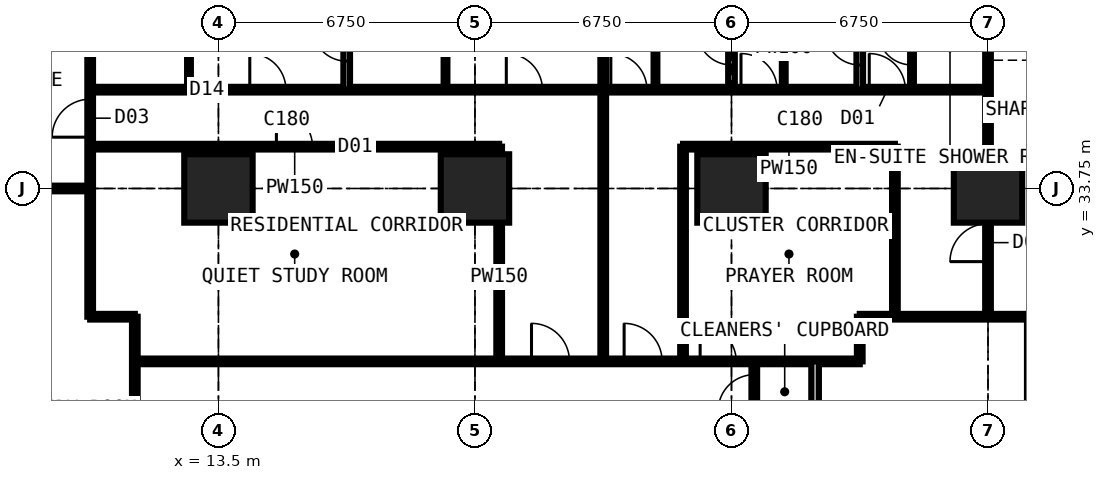
"""IFC4 building model, lengths in metres.
Left out: names, types, materials, properties, quantities, classifications, styles, units other than length and angle.
Written with IfcOpenShell. Run it as: python <this file> out.ifc"""

import sys

from ifc_helpers import new_model, si_unit, direction, frame, frame_2d, origin, origin_2d, place, context, subcontext, project, spatial, rectangle, extrude, element, fill, save


model = new_model("IFC4")
c1 = context("Model", 3, precision=1e-05, world=origin(), true_north=direction((0.0, 1.0)))
c2 = subcontext(c1, "Body", "Model", "MODEL_VIEW")
j1 = project(units=[si_unit("LENGTHUNIT", "METRE"), si_unit("PLANEANGLEUNIT", "RADIAN")], contexts=[c1])
p1 = place(None, origin())
s1 = spatial("IfcSite", under=j1, at=p1, CompositionType="ELEMENT")
p2 = place(p1, origin())
s2 = spatial("IfcBuilding", under=s1, at=p2, CompositionType="ELEMENT")
p3 = place(p2, frame((0.0, 0.0, 61.2)))
s3 = spatial("IfcBuildingStorey", under=s2, at=p3, CompositionType="ELEMENT", Elevation=61.2)
for number, where, z_axis, x_axis in (
    (1, (13.5, 33.75, 0.0), (0.0, 0.0, 1.0), (1.0, 0.0, 0.0)),
    (2, (20.25, 33.75, 0.0), (0.0, 0.0, 1.0), (1.0, 0.0, 0.0)),
    (3, (27.0, 33.75, 0.0), (0.0, 0.0, 1.0), (1.0, 0.0, 0.0)),
    (4, (33.75, 33.75, 0.0), (0.0, 0.0, 1.0), (1.0, 0.0, 0.0)),
):
    element("IfcColumn", number, at=place(p3, frame(where, z_axis=z_axis, x_axis=x_axis)), inside=s3, PredefinedType="COLUMN", context=c2, shape_type="SweptSolid", body=[
        extrude(rectangle(XDim=1.8, YDim=1.8, at=origin_2d()), origin(), (0.0, 0.0, 1.0), 3.6),
    ])
p4 = place(p3, frame((4.15, 33.75, 0.0), z_axis=(0.0, 0.0, 1.0), x_axis=(1.0, 0.0, 0.0)))
e5 = element("IfcWall", 5, at=p4, inside=s3, PredefinedType="PARTITIONING", context=c2, shape_type="SweptSolid", body=[
    extrude(rectangle(XDim=5.975, YDim=0.15, at=frame_2d((2.988, 0.0))), origin(), (0.0, 0.0, 1.0), 2.877),
])
p5 = place(p3, frame((10.125, 30.375, 0.0), z_axis=(0.0, 0.0, 1.0), x_axis=(0.0, 1.0, 0.0)))
e6 = element("IfcWall", 6, at=p5, inside=s3, PredefinedType="PARTITIONING", context=c2, shape_type="SweptSolid", body=[
    extrude(rectangle(XDim=10.859, YDim=0.15, at=frame_2d((5.429, 0.0))), origin(), (0.0, 0.0, 1.0), 3.375),
])
p6 = place(p5, frame((4.725, 0.0, 0.0)))
e7 = element("IfcOpeningElement", 7, at=p6, cuts=e6, PredefinedType="OPENING", context=c2, shape_type="SweptSolid", body=[
    extrude(rectangle(XDim=1.0, YDim=2.2, at=frame_2d((0.5, 1.1))), frame((0.0, 0.085, 0.0), z_axis=(0.0, -1.0, 0.0), x_axis=(1.0, 0.0, 0.0)), (0.0, 0.0, 1.0), 0.17),
])
p7 = place(p3, frame((10.125, 30.375, 0.0), z_axis=(0.0, 0.0, 1.0), x_axis=(1.0, 0.0, 0.0)))
e8 = element("IfcWall", 8, at=p7, inside=s3, PredefinedType="PARTITIONING", context=c2, shape_type="SweptSolid", body=[
    extrude(rectangle(XDim=1.175, YDim=0.15, at=frame_2d((0.587, 0.0))), origin(), (0.0, 0.0, 1.0), 3.375),
])
p8 = place(p3, frame((10.125, 34.85, 0.0), z_axis=(0.0, 0.0, 1.0), x_axis=(1.0, 0.0, 0.0)))
e9 = element("IfcWall", 9, at=p8, inside=s3, PredefinedType="PARTITIONING", context=c2, shape_type="SweptSolid", body=[
    extrude(rectangle(XDim=10.762, YDim=0.15, at=frame_2d((5.381, 0.0))), origin(), (0.0, 0.0, 1.0), 3.375),
])
p9 = place(p8, frame((4.9, 0.0, 0.0)))
e10 = element("IfcOpeningElement", 10, at=p9, cuts=e9, PredefinedType="OPENING", context=c2, shape_type="SweptSolid", body=[
    extrude(rectangle(XDim=0.95, YDim=2.2, at=frame_2d((0.475, 1.1))), frame((0.0, 0.085, 0.0), z_axis=(0.0, -1.0, 0.0), x_axis=(1.0, 0.0, 0.0)), (0.0, 0.0, 1.0), 0.17),
])
p10 = place(p3, frame((10.125, 36.35, 0.0), z_axis=(0.0, 0.0, 1.0), x_axis=(1.0, 0.0, 0.0)))
e11 = element("IfcWall", 11, at=p10, inside=s3, PredefinedType="PARTITIONING", context=c2, shape_type="SweptSolid", body=[
    extrude(rectangle(XDim=23.625, YDim=0.15, at=frame_2d((11.812, 0.0))), origin(), (0.0, 0.0, 1.0), 3.375),
])
p11 = place(p10, frame((20.5, 0.0, 0.0)))
e12 = element("IfcOpeningElement", 12, at=p11, cuts=e11, PredefinedType="OPENING", context=c2, shape_type="SweptSolid", body=[
    extrude(rectangle(XDim=0.95, YDim=2.2, at=frame_2d((0.475, 1.1))), frame((0.0, 0.085, 0.0), z_axis=(0.0, -1.0, 0.0), x_axis=(1.0, 0.0, 0.0)), (0.0, 0.0, 1.0), 0.17),
])
p12 = place(p10, frame((17.125, 0.0, 0.0)))
e13 = element("IfcOpeningElement", 13, at=p12, cuts=e11, PredefinedType="OPENING", context=c2, shape_type="SweptSolid", body=[
    extrude(rectangle(XDim=0.95, YDim=2.2, at=frame_2d((0.475, 1.1))), frame((0.0, 0.085, 0.0), z_axis=(0.0, -1.0, 0.0), x_axis=(1.0, 0.0, 0.0)), (0.0, 0.0, 1.0), 0.17),
])
p13 = place(p10, frame((13.7, 0.0, 0.0)))
e14 = element("IfcOpeningElement", 14, at=p13, cuts=e11, PredefinedType="OPENING", context=c2, shape_type="SweptSolid", body=[
    extrude(rectangle(XDim=0.95, YDim=2.2, at=frame_2d((0.475, 1.1))), frame((0.0, 0.085, 0.0), z_axis=(0.0, -1.0, 0.0), x_axis=(1.0, 0.0, 0.0)), (0.0, 0.0, 1.0), 0.17),
])
p14 = place(p10, frame((4.2, 0.0, 0.0)))
e15 = element("IfcOpeningElement", 15, at=p14, cuts=e11, PredefinedType="OPENING", context=c2, shape_type="SweptSolid", body=[
    extrude(rectangle(XDim=0.95, YDim=2.2, at=frame_2d((0.475, 1.1))), frame((0.0, 0.085, 0.0), z_axis=(0.0, -1.0, 0.0), x_axis=(1.0, 0.0, 0.0)), (0.0, 0.0, 1.0), 0.17),
])
p15 = place(p10, frame((10.95, 0.0, 0.0)))
e16 = element("IfcOpeningElement", 16, at=p15, cuts=e11, PredefinedType="OPENING", context=c2, shape_type="SweptSolid", body=[
    extrude(rectangle(XDim=0.95, YDim=2.2, at=frame_2d((0.475, 1.1))), frame((0.0, 0.085, 0.0), z_axis=(0.0, -1.0, 0.0), x_axis=(1.0, 0.0, 0.0)), (0.0, 0.0, 1.0), 0.17),
])
p16 = place(p3, frame((11.3, 11.3, 0.0), z_axis=(0.0, 0.0, 1.0), x_axis=(0.0, 1.0, 0.0)))
e17 = element("IfcWall", 17, at=p16, inside=s3, PredefinedType="PARTITIONING", context=c2, shape_type="SweptSolid", body=[
    extrude(rectangle(XDim=19.075, YDim=0.15, at=frame_2d((9.538, 0.0))), origin(), (0.0, 0.0, 1.0), 3.375),
])
p17 = place(p16, frame((10.137, 0.0, 0.0)))
e18 = element("IfcOpeningElement", 18, at=p17, cuts=e17, PredefinedType="OPENING", context=c2, shape_type="SweptSolid", body=[
    extrude(rectangle(XDim=1.0, YDim=2.2, at=frame_2d((0.5, 1.1))), frame((0.0, 0.085, 0.0), z_axis=(0.0, -1.0, 0.0), x_axis=(1.0, 0.0, 0.0)), (0.0, 0.0, 1.0), 0.17),
])
p18 = place(p3, frame((11.3, 29.2, 0.0), z_axis=(0.0, 0.0, 1.0), x_axis=(1.0, 0.0, 0.0)))
e19 = element("IfcWall", 19, at=p18, inside=s3, PredefinedType="PARTITIONING", context=c2, shape_type="SweptSolid", body=[
    extrude(rectangle(XDim=19.075, YDim=0.15, at=frame_2d((9.538, 0.0))), origin(), (0.0, 0.0, 1.0), 3.375),
])
p19 = place(p18, frame((12.875, 0.0, 0.0)))
e20 = element("IfcOpeningElement", 20, at=p19, cuts=e19, PredefinedType="OPENING", context=c2, shape_type="SweptSolid", body=[
    extrude(rectangle(XDim=1.0, YDim=2.2, at=frame_2d((0.5, 1.1))), frame((0.0, 0.085, 0.0), z_axis=(0.0, -1.0, 0.0), x_axis=(1.0, 0.0, 0.0)), (0.0, 0.0, 1.0), 0.17),
])
p20 = place(p18, frame((10.438, 0.0, 0.0)))
e21 = element("IfcOpeningElement", 21, at=p20, cuts=e19, PredefinedType="OPENING", context=c2, shape_type="SweptSolid", body=[
    extrude(rectangle(XDim=1.0, YDim=2.2, at=frame_2d((0.5, 1.1))), frame((0.0, 0.085, 0.0), z_axis=(0.0, -1.0, 0.0), x_axis=(1.0, 0.0, 0.0)), (0.0, 0.0, 1.0), 0.17),
])
p21 = place(p18, frame((14.875, 0.0, 0.0)))
e22 = element("IfcOpeningElement", 22, at=p21, cuts=e19, PredefinedType="OPENING", context=c2, shape_type="SweptSolid", body=[
    extrude(rectangle(XDim=0.95, YDim=2.2, at=frame_2d((0.475, 1.1))), frame((0.0, 0.085, 0.0), z_axis=(0.0, -1.0, 0.0), x_axis=(1.0, 0.0, 0.0)), (0.0, 0.0, 1.0), 0.17),
])
p22 = place(p3, frame((12.725, 36.35, 0.0), z_axis=(0.0, 0.0, 1.0), x_axis=(0.0, 1.0, 0.0)))
e23 = element("IfcWall", 23, at=p22, inside=s3, PredefinedType="PARTITIONING", context=c2, shape_type="SweptSolid", body=[
    extrude(rectangle(XDim=2.4, YDim=0.1, at=frame_2d((1.2, 0.0))), origin(), (0.0, 0.0, 1.0), 3.375),
])
p23 = place(p3, frame((16.875, 36.35, 0.0), z_axis=(0.0, 0.0, 1.0), x_axis=(0.0, 1.0, 0.0)))
e24 = element("IfcWall", 24, at=p23, inside=s3, PredefinedType="PARTITIONING", context=c2, shape_type="SweptSolid", body=[
    extrude(rectangle(XDim=4.884, YDim=0.175, at=frame_2d((2.442, 0.0))), origin(), (0.0, 0.0, 1.0), 3.375),
])
p24 = place(p23, frame((0.75, 0.0, 0.0)))
e25 = element("IfcOpeningElement", 25, at=p24, cuts=e24, PredefinedType="OPENING", context=c2, shape_type="SweptSolid", body=[
    extrude(rectangle(XDim=0.9, YDim=2.2, at=frame_2d((0.45, 1.1))), frame((0.0, 0.097, 0.0), z_axis=(0.0, -1.0, 0.0), x_axis=(1.0, 0.0, 0.0)), (0.0, 0.0, 1.0), 0.195),
])
p25 = place(p3, frame((19.475, 36.35, 0.0), z_axis=(0.0, 0.0, 1.0), x_axis=(0.0, 1.0, 0.0)))
e26 = element("IfcWall", 26, at=p25, inside=s3, PredefinedType="PARTITIONING", context=c2, shape_type="SweptSolid", body=[
    extrude(rectangle(XDim=2.4, YDim=0.1, at=frame_2d((1.2, 0.0))), origin(), (0.0, 0.0, 1.0), 3.375),
])
p26 = place(p3, frame((20.887, 29.2, 0.0), z_axis=(0.0, 0.0, 1.0), x_axis=(0.0, 1.0, 0.0)))
e27 = element("IfcWall", 27, at=p26, inside=s3, PredefinedType="PARTITIONING", context=c2, shape_type="SweptSolid", body=[
    extrude(rectangle(XDim=5.65, YDim=0.15, at=frame_2d((2.825, 0.0))), origin(), (0.0, 0.0, 1.0), 3.375),
])
p27 = place(p3, frame((23.625, 29.2, 0.0), z_axis=(0.0, 0.0, 1.0), x_axis=(0.0, 1.0, 0.0)))
e28 = element("IfcWall", 28, at=p27, inside=s3, PredefinedType="PARTITIONING", context=c2, shape_type="SweptSolid", body=[
    extrude(rectangle(XDim=12.034, YDim=0.15, at=frame_2d((6.017, 0.0))), origin(), (0.0, 0.0, 1.0), 3.375),
])
p28 = place(p3, frame((25.0, 36.35, 0.0), z_axis=(0.0, 0.0, 1.0), x_axis=(0.0, 1.0, 0.0)))
e29 = element("IfcWall", 29, at=p28, inside=s3, PredefinedType="PARTITIONING", context=c2, shape_type="SweptSolid", body=[
    extrude(rectangle(XDim=2.2, YDim=0.1, at=frame_2d((1.1, 0.0))), origin(), (0.0, 0.0, 1.0), 3.375),
])
p29 = place(p3, frame((25.725, 29.2, 0.0), z_axis=(0.0, 0.0, 1.0), x_axis=(0.0, 1.0, 0.0)))
e30 = element("IfcWall", 30, at=p29, inside=s3, PredefinedType="PARTITIONING", context=c2, shape_type="SweptSolid", body=[
    extrude(rectangle(XDim=5.65, YDim=0.15, at=frame_2d((2.825, 0.0))), origin(), (0.0, 0.0, 1.0), 3.375),
])
p30 = place(p3, frame((25.725, 34.85, 0.0), z_axis=(0.0, 0.0, 1.0), x_axis=(1.0, 0.0, 0.0)))
e31 = element("IfcWall", 31, at=p30, inside=s3, PredefinedType="PARTITIONING", context=c2, shape_type="SweptSolid", body=[
    extrude(rectangle(XDim=5.575, YDim=0.15, at=frame_2d((2.788, 0.0))), origin(), (0.0, 0.0, 1.0), 3.375),
])
p31 = place(p3, frame((27.0, 36.35, 0.0), z_axis=(0.0, 0.0, 1.0), x_axis=(0.0, 1.0, 0.0)))
e32 = element("IfcWall", 32, at=p31, inside=s3, PredefinedType="PARTITIONING", context=c2, shape_type="SweptSolid", body=[
    extrude(rectangle(XDim=4.884, YDim=0.175, at=frame_2d((2.442, 0.0))), origin(), (0.0, 0.0, 1.0), 2.61),
])
p32 = place(p31, frame((0.65, 0.0, 0.0)))
e33 = element("IfcOpeningElement", 33, at=p32, cuts=e32, PredefinedType="OPENING", context=c2, shape_type="SweptSolid", body=[
    extrude(rectangle(XDim=0.9, YDim=2.2, at=frame_2d((0.45, 1.1))), frame((0.0, 0.097, 0.0), z_axis=(0.0, -1.0, 0.0), x_axis=(1.0, 0.0, 0.0)), (0.0, 0.0, 1.0), 0.195),
])
p33 = place(p3, frame((27.6, 27.6, 0.0), z_axis=(0.0, 0.0, 1.0), x_axis=(0.0, 1.0, 0.0)))
e34 = element("IfcWall", 34, at=p33, inside=s3, PredefinedType="PARTITIONING", context=c2, shape_type="SweptSolid", body=[
    extrude(rectangle(XDim=1.6, YDim=0.15, at=frame_2d((0.8, 0.0))), origin(), (0.0, 0.0, 1.0), 3.375),
])
p34 = place(p33, frame((0.3, 0.0, 0.0)))
e35 = element("IfcOpeningElement", 35, at=p34, cuts=e34, PredefinedType="OPENING", context=c2, shape_type="SweptSolid", body=[
    extrude(rectangle(XDim=0.95, YDim=2.2, at=frame_2d((0.475, 1.1))), frame((0.0, 0.085, 0.0), z_axis=(0.0, -1.0, 0.0), x_axis=(1.0, 0.0, 0.0)), (0.0, 0.0, 1.0), 0.17),
])
p35 = place(p3, frame((28.375, 36.35, 0.0), z_axis=(0.0, 0.0, 1.0), x_axis=(0.0, 1.0, 0.0)))
e36 = element("IfcWall", 36, at=p35, inside=s3, PredefinedType="PARTITIONING", context=c2, shape_type="SweptSolid", body=[
    extrude(rectangle(XDim=2.2, YDim=0.1, at=frame_2d((1.1, 0.0))), origin(), (0.0, 0.0, 1.0), 3.375),
])
p36 = place(p3, frame((29.2, 11.3, 0.0), z_axis=(0.0, 0.0, 1.0), x_axis=(0.0, 1.0, 0.0)))
e37 = element("IfcWall", 37, at=p36, inside=s3, PredefinedType="PARTITIONING", context=c2, shape_type="SweptSolid", body=[
    extrude(rectangle(XDim=17.9, YDim=0.2, at=frame_2d((8.95, 0.0))), origin(), (0.0, 0.0, 1.0), 3.375),
])
p37 = place(p36, frame((8.35, 0.0, 0.0)))
e38 = element("IfcOpeningElement", 38, at=p37, cuts=e37, PredefinedType="OPENING", context=c2, shape_type="SweptSolid", body=[
    extrude(rectangle(XDim=1.2, YDim=2.2, at=frame_2d((0.6, 1.1))), frame((0.0, 0.11, 0.0), z_axis=(0.0, -1.0, 0.0), x_axis=(1.0, 0.0, 0.0)), (0.0, 0.0, 1.0), 0.22),
])
p38 = place(p3, frame((30.375, 29.2, 0.0), z_axis=(0.0, 0.0, 1.0), x_axis=(0.0, 1.0, 0.0)))
e39 = element("IfcWall", 39, at=p38, inside=s3, PredefinedType="PARTITIONING", context=c2, shape_type="SweptSolid", body=[
    extrude(rectangle(XDim=1.175, YDim=0.15, at=frame_2d((0.587, 0.0))), origin(), (0.0, 0.0, 1.0), 3.375),
])
p39 = place(p3, frame((30.375, 30.375, 0.0), z_axis=(0.0, 0.0, 1.0), x_axis=(1.0, 0.0, 0.0)))
e40 = element("IfcWall", 40, at=p39, inside=s3, PredefinedType="PARTITIONING", context=c2, shape_type="SweptSolid", body=[
    extrude(rectangle(XDim=10.859, YDim=0.15, at=frame_2d((5.429, 0.0))), origin(), (0.0, 0.0, 1.0), 3.375),
])
p40 = place(p3, frame((30.375, 36.35, 0.0), z_axis=(0.0, 0.0, 1.0), x_axis=(0.0, 1.0, 0.0)))
e41 = element("IfcWall", 41, at=p40, inside=s3, PredefinedType="PARTITIONING", context=c2, shape_type="SweptSolid", body=[
    extrude(rectangle(XDim=4.884, YDim=0.175, at=frame_2d((2.442, 0.0))), origin(), (0.0, 0.0, 1.0), 3.375),
])
p41 = place(p40, frame((0.65, 0.0, 0.0)))
e42 = element("IfcOpeningElement", 42, at=p41, cuts=e41, PredefinedType="OPENING", context=c2, shape_type="SweptSolid", body=[
    extrude(rectangle(XDim=0.9, YDim=2.2, at=frame_2d((0.45, 1.1))), frame((0.0, 0.097, 0.0), z_axis=(0.0, -1.0, 0.0), x_axis=(1.0, 0.0, 0.0)), (0.0, 0.0, 1.0), 0.195),
])
p42 = place(p3, frame((31.3, 30.375, 0.0), z_axis=(0.0, 0.0, 1.0), x_axis=(0.0, 1.0, 0.0)))
e43 = element("IfcWall", 43, at=p42, inside=s3, PredefinedType="PARTITIONING", context=c2, shape_type="SweptSolid", body=[
    extrude(rectangle(XDim=4.475, YDim=0.15, at=frame_2d((2.238, 0.0))), origin(), (0.0, 0.0, 1.0), 3.375),
])
p43 = place(p3, frame((31.75, 36.35, 0.0), z_axis=(0.0, 0.0, 1.0), x_axis=(0.0, 1.0, 0.0)))
e44 = element("IfcWall", 44, at=p43, inside=s3, PredefinedType="PARTITIONING", context=c2, shape_type="SweptSolid", body=[
    extrude(rectangle(XDim=2.2, YDim=0.1, at=frame_2d((1.1, 0.0))), origin(), (0.0, 0.0, 1.0), 3.375),
])
p44 = place(p43, frame((0.65, 0.0, 0.0)))
e45 = element("IfcOpeningElement", 45, at=p44, cuts=e44, PredefinedType="OPENING", context=c2, shape_type="SweptSolid", body=[
    extrude(rectangle(XDim=0.9, YDim=2.2, at=frame_2d((0.45, 1.1))), frame((0.0, 0.06, 0.0), z_axis=(0.0, -1.0, 0.0), x_axis=(1.0, 0.0, 0.0)), (0.0, 0.0, 1.0), 0.12),
])
p45 = place(p3, frame((33.75, 30.375, 0.0), z_axis=(0.0, 0.0, 1.0), x_axis=(0.0, 1.0, 0.0)))
e46 = element("IfcWall", 46, at=p45, inside=s3, PredefinedType="PARTITIONING", context=c2, shape_type="SweptSolid", body=[
    extrude(rectangle(XDim=10.859, YDim=0.15, at=frame_2d((5.429, 0.0))), origin(), (0.0, 0.0, 1.0), 2.877),
])
p46 = place(p45, frame((1.45, 0.0, 0.0)))
e47 = element("IfcOpeningElement", 47, at=p46, cuts=e46, PredefinedType="OPENING", context=c2, shape_type="SweptSolid", body=[
    extrude(rectangle(XDim=1.0, YDim=2.2, at=frame_2d((0.5, 1.1))), frame((0.0, 0.085, 0.0), z_axis=(0.0, -1.0, 0.0), x_axis=(1.0, 0.0, 0.0)), (0.0, 0.0, 1.0), 0.17),
])
p47 = place(p34, origin())
e48 = element("IfcDoor", 48, at=p47, inside=s3, OperationType="SINGLE_SWING_LEFT", PredefinedType="DOOR", context=c2, shape_type="SweptSolid", body=[
    extrude(rectangle(XDim=0.95, YDim=2.2, at=frame_2d((0.475, 1.1))), frame((0.0, 0.025, 0.0), z_axis=(0.0, -1.0, 0.0), x_axis=(1.0, 0.0, 0.0)), (0.0, 0.0, 1.0), 0.05),
])
fill(e35, e48)
p48 = place(p46, origin())
e49 = element("IfcDoor", 49, at=p48, inside=s3, OperationType="SINGLE_SWING_LEFT", PredefinedType="DOOR", context=c2, shape_type="SweptSolid", body=[
    extrude(rectangle(XDim=1.0, YDim=2.2, at=frame_2d((0.5, 1.1))), frame((0.0, 0.025, 0.0), z_axis=(0.0, -1.0, 0.0), x_axis=(1.0, 0.0, 0.0)), (0.0, 0.0, 1.0), 0.05),
])
fill(e47, e49)
p49 = place(p11, origin())
e50 = element("IfcDoor", 50, at=p49, inside=s3, OperationType="SINGLE_SWING_LEFT", PredefinedType="DOOR", context=c2, shape_type="SweptSolid", body=[
    extrude(rectangle(XDim=0.95, YDim=2.2, at=frame_2d((0.475, 1.1))), frame((0.0, 0.025, 0.0), z_axis=(0.0, -1.0, 0.0), x_axis=(1.0, 0.0, 0.0)), (0.0, 0.0, 1.0), 0.05),
])
fill(e12, e50)
p50 = place(p44, origin())
e51 = element("IfcDoor", 51, at=p50, inside=s3, OperationType="SINGLE_SWING_RIGHT", PredefinedType="DOOR", context=c2, shape_type="SweptSolid", body=[
    extrude(rectangle(XDim=0.9, YDim=2.2, at=frame_2d((0.45, 1.1))), frame((0.0, 0.025, 0.0), z_axis=(0.0, -1.0, 0.0), x_axis=(1.0, 0.0, 0.0)), (0.0, 0.0, 1.0), 0.05),
])
fill(e45, e51)
p51 = place(p12, origin())
e52 = element("IfcDoor", 52, at=p51, inside=s3, OperationType="SINGLE_SWING_LEFT", PredefinedType="DOOR", context=c2, shape_type="SweptSolid", body=[
    extrude(rectangle(XDim=0.95, YDim=2.2, at=frame_2d((0.475, 1.1))), frame((0.0, 0.025, 0.0), z_axis=(0.0, -1.0, 0.0), x_axis=(1.0, 0.0, 0.0)), (0.0, 0.0, 1.0), 0.05),
])
fill(e13, e52)
p52 = place(p41, origin())
e53 = element("IfcDoor", 53, at=p52, inside=s3, OperationType="SINGLE_SWING_RIGHT", PredefinedType="DOOR", context=c2, shape_type="SweptSolid", body=[
    extrude(rectangle(XDim=0.9, YDim=2.2, at=frame_2d((0.45, 1.1))), frame((0.0, 0.025, 0.0), z_axis=(0.0, -1.0, 0.0), x_axis=(1.0, 0.0, 0.0)), (0.0, 0.0, 1.0), 0.05),
])
fill(e42, e53)
p53 = place(p13, origin())
e54 = element("IfcDoor", 54, at=p53, inside=s3, OperationType="SINGLE_SWING_LEFT", PredefinedType="DOOR", context=c2, shape_type="SweptSolid", body=[
    extrude(rectangle(XDim=0.95, YDim=2.2, at=frame_2d((0.475, 1.1))), frame((0.0, 0.025, 0.0), z_axis=(0.0, -1.0, 0.0), x_axis=(1.0, 0.0, 0.0)), (0.0, 0.0, 1.0), 0.05),
])
fill(e14, e54)
p54 = place(p32, origin())
e55 = element("IfcDoor", 55, at=p54, inside=s3, OperationType="SINGLE_SWING_RIGHT", PredefinedType="DOOR", context=c2, shape_type="SweptSolid", body=[
    extrude(rectangle(XDim=0.9, YDim=2.2, at=frame_2d((0.45, 1.1))), frame((0.0, 0.025, 0.0), z_axis=(0.0, -1.0, 0.0), x_axis=(1.0, 0.0, 0.0)), (0.0, 0.0, 1.0), 0.05),
])
fill(e33, e55)
p55 = place(p19, origin())
e56 = element("IfcDoor", 56, at=p55, inside=s3, OperationType="SINGLE_SWING_LEFT", PredefinedType="DOOR", context=c2, shape_type="SweptSolid", body=[
    extrude(rectangle(XDim=1.0, YDim=2.2, at=frame_2d((0.5, 1.1))), frame((0.0, 0.025, 0.0), z_axis=(0.0, -1.0, 0.0), x_axis=(1.0, 0.0, 0.0)), (0.0, 0.0, 1.0), 0.05),
])
fill(e20, e56)
p56 = place(p14, origin())
e57 = element("IfcDoor", 57, at=p56, inside=s3, OperationType="SINGLE_SWING_LEFT", PredefinedType="DOOR", context=c2, shape_type="SweptSolid", body=[
    extrude(rectangle(XDim=0.95, YDim=2.2, at=frame_2d((0.475, 1.1))), frame((0.0, 0.025, 0.0), z_axis=(0.0, -1.0, 0.0), x_axis=(1.0, 0.0, 0.0)), (0.0, 0.0, 1.0), 0.05),
])
fill(e15, e57)
p57 = place(p15, origin())
e58 = element("IfcDoor", 58, at=p57, inside=s3, OperationType="SINGLE_SWING_LEFT", PredefinedType="DOOR", context=c2, shape_type="SweptSolid", body=[
    extrude(rectangle(XDim=0.95, YDim=2.2, at=frame_2d((0.475, 1.1))), frame((0.0, 0.025, 0.0), z_axis=(0.0, -1.0, 0.0), x_axis=(1.0, 0.0, 0.0)), (0.0, 0.0, 1.0), 0.05),
])
fill(e16, e58)
p58 = place(p24, origin())
e59 = element("IfcDoor", 59, at=p58, inside=s3, OperationType="SINGLE_SWING_RIGHT", PredefinedType="DOOR", context=c2, shape_type="SweptSolid", body=[
    extrude(rectangle(XDim=0.9, YDim=2.2, at=frame_2d((0.45, 1.1))), frame((0.0, 0.025, 0.0), z_axis=(0.0, -1.0, 0.0), x_axis=(1.0, 0.0, 0.0)), (0.0, 0.0, 1.0), 0.05),
])
fill(e25, e59)
p59 = place(p20, origin())
e60 = element("IfcDoor", 60, at=p59, inside=s3, OperationType="SINGLE_SWING_LEFT", PredefinedType="DOOR", context=c2, shape_type="SweptSolid", body=[
    extrude(rectangle(XDim=1.0, YDim=2.2, at=frame_2d((0.5, 1.1))), frame((0.0, 0.025, 0.0), z_axis=(0.0, -1.0, 0.0), x_axis=(1.0, 0.0, 0.0)), (0.0, 0.0, 1.0), 0.05),
])
fill(e21, e60)
p60 = place(p21, origin())
e61 = element("IfcDoor", 61, at=p60, inside=s3, OperationType="SINGLE_SWING_LEFT", PredefinedType="DOOR", context=c2, shape_type="SweptSolid", body=[
    extrude(rectangle(XDim=0.95, YDim=2.2, at=frame_2d((0.475, 1.1))), frame((0.0, 0.025, 0.0), z_axis=(0.0, -1.0, 0.0), x_axis=(1.0, 0.0, 0.0)), (0.0, 0.0, 1.0), 0.05),
])
fill(e22, e61)
p61 = place(p9, origin())
e62 = element("IfcDoor", 62, at=p61, inside=s3, OperationType="SINGLE_SWING_LEFT", PredefinedType="DOOR", context=c2, shape_type="SweptSolid", body=[
    extrude(rectangle(XDim=0.95, YDim=2.2, at=frame_2d((0.475, 1.1))), frame((0.0, 0.025, 0.0), z_axis=(0.0, -1.0, 0.0), x_axis=(1.0, 0.0, 0.0)), (0.0, 0.0, 1.0), 0.05),
])
fill(e10, e62)
p62 = place(p6, origin())
e63 = element("IfcDoor", 63, at=p62, inside=s3, OperationType="SINGLE_SWING_LEFT", PredefinedType="DOOR", context=c2, shape_type="SweptSolid", body=[
    extrude(rectangle(XDim=1.0, YDim=2.2, at=frame_2d((0.5, 1.1))), frame((0.0, 0.025, 0.0), z_axis=(0.0, -1.0, 0.0), x_axis=(1.0, 0.0, 0.0)), (0.0, 0.0, 1.0), 0.05),
])
fill(e7, e63)
save(model, sys.argv[1])
